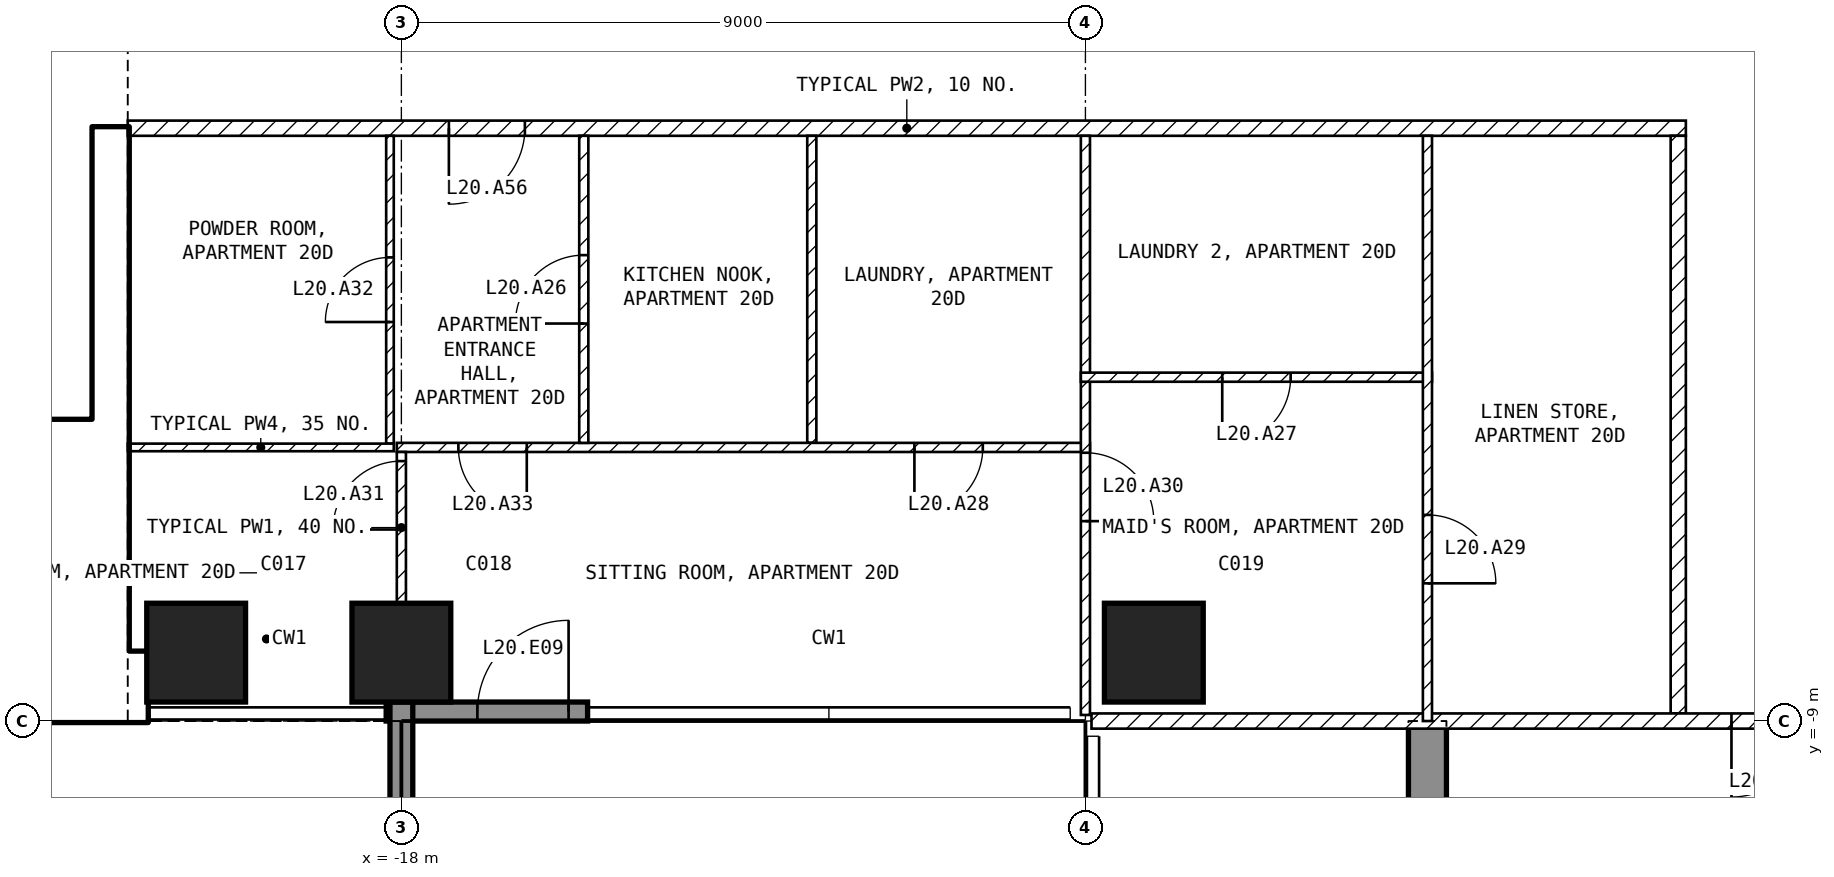
"""IFC4 building model, lengths in metres.
Left out: names, types, materials, properties, quantities, classifications, styles, units other than length and angle.
Written with IfcOpenShell. Run it as: python <this file> out.ifc"""

import sys

from ifc_helpers import new_model, si_unit, direction, frame, frame_2d, origin, origin_2d, place, context, subcontext, project, spatial, polyline, rectangle, outline, extrude, element, fill, save


model = new_model("IFC4")
c1 = context("Model", 3, precision=1e-05, world=origin(), true_north=direction((0.0, 1.0)))
c2 = subcontext(c1, "Body", "Model", "MODEL_VIEW")
j1 = project(units=[si_unit("LENGTHUNIT", "METRE"), si_unit("PLANEANGLEUNIT", "RADIAN")], contexts=[c1])
p1 = place(None, origin())
s1 = spatial("IfcSite", under=j1, at=p1, CompositionType="ELEMENT")
p2 = place(p1, origin())
s2 = spatial("IfcBuilding", under=s1, at=p2, CompositionType="ELEMENT")
p3 = place(p2, frame((0.0, 0.0, 89.0)))
s3 = spatial("IfcBuildingStorey", under=s2, at=p3, CompositionType="ELEMENT", Elevation=89.0)
for number, where, z_axis, x_axis in (
    (1, (-20.7, -8.1, -0.25), (0.0, 0.0, 1.0), (1.0, 0.0, 0.0)),
    (2, (-18.0, -8.1, -0.25), (0.0, 0.0, 1.0), (1.0, 0.0, 0.0)),
    (3, (-8.1, -8.1, -0.25), (0.0, 0.0, 1.0), (1.0, 0.0, 0.0)),
):
    element("IfcColumn", number, at=place(p3, frame(where, z_axis=z_axis, x_axis=x_axis)), inside=s3, PredefinedType="COLUMN", context=c2, shape_type="SweptSolid", body=[
        extrude(rectangle(XDim=1.3, YDim=1.3, at=origin_2d()), origin(), (0.0, 0.0, 1.0), 3.45),
    ])
p4 = place(p3, frame((-4.75, -25.45, -0.25), z_axis=(1.0, 0.0, 0.0), x_axis=(0.0, 1.0, 0.0)))
e4 = element("IfcWall", 4, at=p4, inside=s3, PredefinedType="SHEAR", context=c2, shape_type="SweptSolid", body=[
    extrude(outline(polyline([(0.0, 0.0), (4.15, 0.0), (4.15, 2.65), (6.55, 2.65), (6.55, 0.0), (11.95, 0.0), (11.95, 2.65), (14.35, 2.65), (14.35, 0.0), (16.45, 0.0), (16.45, 3.45), (0.0, 3.45), (0.0, 0.0)])), origin(), (0.0, 0.0, 1.0), 0.5),
])
p5 = place(p3, frame((-18.2, -8.875, 0.0), z_axis=(0.0, 0.0, 1.0), x_axis=(1.0, 0.0, 0.0)))
e5 = element("IfcWall", 5, at=p5, inside=s3, PredefinedType="SOLIDWALL", context=c2, shape_type="SweptSolid", body=[
    extrude(rectangle(XDim=2.65, YDim=0.25, at=frame_2d((1.325, 0.0))), origin(), (0.0, 0.0, 1.0), 3.2),
])
p6 = place(p5, frame((1.2, 0.0, 0.0)))
e6 = element("IfcOpeningElement", 6, at=p6, cuts=e5, PredefinedType="OPENING", context=c2, shape_type="SweptSolid", body=[
    extrude(rectangle(XDim=1.2, YDim=2.4, at=frame_2d((0.6, 1.2))), frame((0.0, 0.135, 0.0), z_axis=(0.0, -1.0, 0.0), x_axis=(1.0, 0.0, 0.0)), (0.0, 0.0, 1.0), 0.27),
])
p7 = place(p3, frame((-18.0, -8.75, 0.0), z_axis=(0.0, 0.0, 1.0), x_axis=(0.0, -1.0, 0.0)))
e7 = element("IfcWall", 7, at=p7, inside=s3, PredefinedType="SOLIDWALL", context=c2, shape_type="SweptSolid", body=[
    extrude(rectangle(XDim=2.95, YDim=0.3, at=frame_2d((1.475, 0.0))), origin(), (0.0, 0.0, 1.0), 3.2),
])
p8 = place(p3, frame((-32.4, -8.55, 0.0), z_axis=(0.0, 0.0, 1.0), x_axis=(1.0, 0.0, 0.0)))
e8 = element("IfcWall", 8, at=p8, inside=s3, PredefinedType="SHEAR", context=c2, shape_type="SweptSolid", body=[
    extrude(rectangle(XDim=11.05, YDim=0.9, at=frame_2d((5.525, 0.0))), origin(), (0.0, 0.0, 1.0), 3.2),
])
p9 = place(p3, frame((-21.825, -8.1, 0.0), z_axis=(0.0, 0.0, 1.0), x_axis=(0.0, 1.0, 0.0)))
e9 = element("IfcWall", 9, at=p9, inside=s3, PredefinedType="SHEAR", context=c2, shape_type="SweptSolid", body=[
    extrude(rectangle(XDim=6.9, YDim=0.45, at=frame_2d((3.45, 0.0))), origin(), (0.0, 0.0, 1.0), 3.2),
])
p10 = place(p3, frame((-28.35, -5.15, 0.0), z_axis=(0.0, 0.0, 1.0), x_axis=(1.0, 0.0, 0.0)))
e10 = element("IfcWall", 10, at=p10, inside=s3, PredefinedType="SOLIDWALL", context=c2, shape_type="SweptSolid", body=[
    extrude(rectangle(XDim=6.3, YDim=0.2, at=frame_2d((3.15, 0.0))), origin(), (0.0, 0.0, 1.0), 3.2),
])
p11 = place(p10, frame((5.1, 0.0, 0.0)))
e11 = element("IfcOpeningElement", 11, at=p11, cuts=e10, PredefinedType="OPENING", context=c2, shape_type="SweptSolid", body=[
    extrude(rectangle(XDim=1.0, YDim=2.1, at=frame_2d((0.5, 1.05))), frame((0.0, 0.11, 0.0), z_axis=(0.0, -1.0, 0.0), x_axis=(1.0, 0.0, 0.0)), (0.0, 0.0, 1.0), 0.22),
])
p12 = place(p3, frame((-1.1, -1.2, 0.0), z_axis=(0.0, 0.0, 1.0), x_axis=(-1.0, 0.0, 0.0)))
e12 = element("IfcWall", 12, at=p12, inside=s3, PredefinedType="PARTITIONING", context=c2, shape_type="SweptSolid", body=[
    extrude(rectangle(XDim=20.5, YDim=0.2, at=frame_2d((10.25, 0.0))), origin(), (0.0, 0.0, 1.0), 3.2),
])
p13 = place(p12, frame((15.275, 0.0, 0.0)))
e13 = element("IfcOpeningElement", 13, at=p13, cuts=e12, PredefinedType="OPENING", context=c2, shape_type="SweptSolid", body=[
    extrude(rectangle(XDim=1.0, YDim=2.1, at=frame_2d((0.5, 1.05))), frame((0.0, 0.11, 0.0), z_axis=(0.0, -1.0, 0.0), x_axis=(1.0, 0.0, 0.0)), (0.0, 0.0, 1.0), 0.22),
])
p14 = place(p3, frame((-1.2, -8.9, 0.0), z_axis=(0.0, 0.0, 1.0), x_axis=(0.0, 1.0, 0.0)))
e14 = element("IfcWall", 14, at=p14, inside=s3, PredefinedType="PARTITIONING", context=c2, shape_type="SweptSolid", body=[
    extrude(rectangle(XDim=7.6, YDim=0.2, at=frame_2d((3.8, 0.0))), origin(), (0.0, 0.0, 1.0), 3.2),
])
p15 = place(p3, frame((8.92, -9.0, 0.0), z_axis=(0.0, 0.0, 1.0), x_axis=(-1.0, 0.0, 0.0)))
e15 = element("IfcWall", 15, at=p15, inside=s3, PredefinedType="PARTITIONING", context=c2, shape_type="SweptSolid", body=[
    extrude(rectangle(XDim=17.84, YDim=0.2, at=frame_2d((8.92, 0.0))), origin(), (0.0, 0.0, 1.0), 3.2),
])
p16 = place(p15, frame((8.42, 0.0, 0.0)))
e16 = element("IfcOpeningElement", 16, at=p16, cuts=e15, PredefinedType="OPENING", context=c2, shape_type="SweptSolid", body=[
    extrude(rectangle(XDim=1.0, YDim=2.1, at=frame_2d((0.5, 1.05))), frame((0.0, 0.11, 0.0), z_axis=(0.0, -1.0, 0.0), x_axis=(1.0, 0.0, 0.0)), (0.0, 0.0, 1.0), 0.22),
])
p17 = place(p3, frame((-12.6, -5.34, 0.0), z_axis=(0.0, 0.0, 1.0), x_axis=(0.0, 1.0, 0.0)))
e17 = element("IfcWall", 17, at=p17, inside=s3, PredefinedType="PARTITIONING", context=c2, shape_type="SweptSolid", body=[
    extrude(rectangle(XDim=4.04, YDim=0.12, at=frame_2d((2.02, 0.0))), origin(), (0.0, 0.0, 1.0), 3.2),
])
p18 = place(p3, frame((-8.94, -5.4, 0.0), z_axis=(0.0, 0.0, 1.0), x_axis=(-1.0, 0.0, 0.0)))
e18 = element("IfcWall", 18, at=p18, inside=s3, PredefinedType="PARTITIONING", context=c2, shape_type="SweptSolid", body=[
    extrude(rectangle(XDim=9.12, YDim=0.12, at=frame_2d((4.56, 0.0))), origin(), (0.0, 0.0, 1.0), 3.2),
])
p19 = place(p18, frame((1.41, 0.0, 0.0)))
e19 = element("IfcOpeningElement", 19, at=p19, cuts=e18, PredefinedType="OPENING", context=c2, shape_type="SweptSolid", body=[
    extrude(rectangle(XDim=0.9, YDim=2.1, at=frame_2d((0.45, 1.05))), frame((0.0, 0.07, 0.0), z_axis=(0.0, -1.0, 0.0), x_axis=(1.0, 0.0, 0.0)), (0.0, 0.0, 1.0), 0.14),
])
p20 = place(p18, frame((7.41, 0.0, 0.0)))
e20 = element("IfcOpeningElement", 20, at=p20, cuts=e18, PredefinedType="OPENING", context=c2, shape_type="SweptSolid", body=[
    extrude(rectangle(XDim=0.9, YDim=2.1, at=frame_2d((0.45, 1.05))), frame((0.0, 0.07, 0.0), z_axis=(0.0, -1.0, 0.0), x_axis=(1.0, 0.0, 0.0)), (0.0, 0.0, 1.0), 0.14),
])
p21 = place(p3, frame((-9.0, -1.3, 0.0), z_axis=(0.0, 0.0, 1.0), x_axis=(0.0, -1.0, 0.0)))
e21 = element("IfcWall", 21, at=p21, inside=s3, PredefinedType="PARTITIONING", context=c2, shape_type="SweptSolid", body=[
    extrude(rectangle(XDim=7.62, YDim=0.12, at=frame_2d((3.81, 0.0))), origin(), (0.0, 0.0, 1.0), 3.2),
])
p22 = place(p21, frame((4.17, 0.0, 0.0)))
e22 = element("IfcOpeningElement", 22, at=p22, cuts=e21, PredefinedType="OPENING", context=c2, shape_type="SweptSolid", body=[
    extrude(rectangle(XDim=0.9, YDim=2.1, at=frame_2d((0.45, 1.05))), frame((0.0, 0.07, 0.0), z_axis=(0.0, -1.0, 0.0), x_axis=(1.0, 0.0, 0.0)), (0.0, 0.0, 1.0), 0.14),
])
p23 = place(p3, frame((-15.6, -5.34, 0.0), z_axis=(0.0, 0.0, 1.0), x_axis=(0.0, 1.0, 0.0)))
e23 = element("IfcWall", 23, at=p23, inside=s3, PredefinedType="PARTITIONING", context=c2, shape_type="SweptSolid", body=[
    extrude(rectangle(XDim=4.04, YDim=0.12, at=frame_2d((2.02, 0.0))), origin(), (0.0, 0.0, 1.0), 3.2),
])
p24 = place(p23, frame((1.57, 0.0, 0.0)))
e24 = element("IfcOpeningElement", 24, at=p24, cuts=e23, PredefinedType="OPENING", context=c2, shape_type="SweptSolid", body=[
    extrude(rectangle(XDim=0.9, YDim=2.1, at=frame_2d((0.45, 1.05))), frame((0.0, 0.07, 0.0), z_axis=(0.0, -1.0, 0.0), x_axis=(1.0, 0.0, 0.0)), (0.0, 0.0, 1.0), 0.14),
])
p25 = place(p3, frame((-18.15, -5.35, 0.0), z_axis=(0.0, 0.0, 1.0), x_axis=(0.0, 1.0, 0.0)))
e25 = element("IfcWall", 25, at=p25, inside=s3, PredefinedType="PARTITIONING", context=c2, shape_type="SweptSolid", body=[
    extrude(rectangle(XDim=4.05, YDim=0.1, at=frame_2d((2.025, 0.0))), origin(), (0.0, 0.0, 1.0), 2.296),
])
p26 = place(p25, frame((1.6, 0.0, 0.0)))
e26 = element("IfcOpeningElement", 26, at=p26, cuts=e25, PredefinedType="OPENING", context=c2, shape_type="SweptSolid", body=[
    extrude(rectangle(XDim=0.85, YDim=2.1, at=frame_2d((0.425, 1.05))), frame((0.0, 0.06, 0.0), z_axis=(0.0, -1.0, 0.0), x_axis=(1.0, 0.0, 0.0)), (0.0, 0.0, 1.0), 0.12),
])
p27 = place(p3, frame((-18.1, -5.4, 0.0), z_axis=(0.0, 0.0, 1.0), x_axis=(-1.0, 0.0, 0.0)))
e27 = element("IfcWall", 27, at=p27, inside=s3, PredefinedType="PARTITIONING", context=c2, shape_type="SweptSolid", body=[
    extrude(rectangle(XDim=3.5, YDim=0.1, at=frame_2d((1.75, 0.0))), origin(), (0.0, 0.0, 1.0), 3.2),
])
p28 = place(p3, frame((-18.0, -7.45, 0.0), z_axis=(0.0, 0.0, 1.0), x_axis=(0.0, 1.0, 0.0)))
e28 = element("IfcWall", 28, at=p28, inside=s3, PredefinedType="PARTITIONING", context=c2, shape_type="SweptSolid", body=[
    extrude(rectangle(XDim=1.99, YDim=0.12, at=frame_2d((0.995, 0.0))), origin(), (0.0, 0.0, 1.0), 2.296),
])
p29 = place(p28, frame((0.97, 0.0, 0.0)))
e29 = element("IfcOpeningElement", 29, at=p29, cuts=e28, PredefinedType="OPENING", context=c2, shape_type="SweptSolid", body=[
    extrude(rectangle(XDim=0.9, YDim=2.1, at=frame_2d((0.45, 1.05))), frame((0.0, 0.07, 0.0), z_axis=(0.0, -1.0, 0.0), x_axis=(1.0, 0.0, 0.0)), (0.0, 0.0, 1.0), 0.14),
])
p30 = place(p3, frame((-4.44, -4.476, 0.0), z_axis=(0.0, 0.0, 1.0), x_axis=(-1.0, 0.0, 0.0)))
e30 = element("IfcWall", 30, at=p30, inside=s3, PredefinedType="PARTITIONING", context=c2, shape_type="SweptSolid", body=[
    extrude(rectangle(XDim=4.62, YDim=0.12, at=frame_2d((2.31, 0.0))), origin(), (0.0, 0.0, 1.0), 3.2),
])
p31 = place(p30, frame((1.86, 0.0, 0.0)))
e31 = element("IfcOpeningElement", 31, at=p31, cuts=e30, PredefinedType="OPENING", context=c2, shape_type="SweptSolid", body=[
    extrude(rectangle(XDim=0.9, YDim=2.1, at=frame_2d((0.45, 1.05))), frame((0.0, 0.07, 0.0), z_axis=(0.0, -1.0, 0.0), x_axis=(1.0, 0.0, 0.0)), (0.0, 0.0, 1.0), 0.14),
])
p32 = place(p3, frame((-4.5, -1.3, 0.0), z_axis=(0.0, 0.0, 1.0), x_axis=(0.0, -1.0, 0.0)))
e32 = element("IfcWall", 32, at=p32, inside=s3, PredefinedType="PARTITIONING", context=c2, shape_type="SweptSolid", body=[
    extrude(rectangle(XDim=7.7, YDim=0.12, at=frame_2d((3.85, 0.0))), origin(), (0.0, 0.0, 1.0), 3.2),
])
p33 = place(p32, frame((4.988, 0.0, 0.0)))
e33 = element("IfcOpeningElement", 33, at=p33, cuts=e32, PredefinedType="OPENING", context=c2, shape_type="SweptSolid", body=[
    extrude(rectangle(XDim=0.9, YDim=2.1, at=frame_2d((0.45, 1.05))), frame((0.0, 0.07, 0.0), z_axis=(0.0, -1.0, 0.0), x_axis=(1.0, 0.0, 0.0)), (0.0, 0.0, 1.0), 0.14),
])
p34 = place(p6, origin())
e34 = element("IfcDoor", 34, at=p34, inside=s3, OperationType="SINGLE_SWING_RIGHT", PredefinedType="DOOR", context=c2, shape_type="SweptSolid", body=[
    extrude(rectangle(XDim=1.2, YDim=2.4, at=frame_2d((0.6, 1.2))), frame((0.0, 0.025, 0.0), z_axis=(0.0, -1.0, 0.0), x_axis=(1.0, 0.0, 0.0)), (0.0, 0.0, 1.0), 0.05),
])
fill(e6, e34)
p35 = place(p11, origin())
e35 = element("IfcDoor", 35, at=p35, inside=s3, OperationType="SINGLE_SWING_LEFT", PredefinedType="DOOR", context=c2, shape_type="SweptSolid", body=[
    extrude(rectangle(XDim=1.0, YDim=2.1, at=frame_2d((0.5, 1.05))), frame((0.0, 0.025, 0.0), z_axis=(0.0, -1.0, 0.0), x_axis=(1.0, 0.0, 0.0)), (0.0, 0.0, 1.0), 0.05),
])
fill(e11, e35)
p36 = place(p24, origin())
e36 = element("IfcDoor", 36, at=p36, inside=s3, OperationType="SINGLE_SWING_LEFT", PredefinedType="DOOR", context=c2, shape_type="SweptSolid", body=[
    extrude(rectangle(XDim=0.9, YDim=2.1, at=frame_2d((0.45, 1.05))), frame((0.0, 0.025, 0.0), z_axis=(0.0, -1.0, 0.0), x_axis=(1.0, 0.0, 0.0)), (0.0, 0.0, 1.0), 0.05),
])
fill(e24, e36)
p37 = place(p31, origin())
e37 = element("IfcDoor", 37, at=p37, inside=s3, OperationType="SINGLE_SWING_RIGHT", PredefinedType="DOOR", context=c2, shape_type="SweptSolid", body=[
    extrude(rectangle(XDim=0.9, YDim=2.1, at=frame_2d((0.45, 1.05))), frame((0.0, 0.025, 0.0), z_axis=(0.0, -1.0, 0.0), x_axis=(1.0, 0.0, 0.0)), (0.0, 0.0, 1.0), 0.05),
])
fill(e31, e37)
p38 = place(p19, origin())
e38 = element("IfcDoor", 38, at=p38, inside=s3, OperationType="SINGLE_SWING_RIGHT", PredefinedType="DOOR", context=c2, shape_type="SweptSolid", body=[
    extrude(rectangle(XDim=0.9, YDim=2.1, at=frame_2d((0.45, 1.05))), frame((0.0, 0.025, 0.0), z_axis=(0.0, -1.0, 0.0), x_axis=(1.0, 0.0, 0.0)), (0.0, 0.0, 1.0), 0.05),
])
fill(e19, e38)
p39 = place(p33, origin())
e39 = element("IfcDoor", 39, at=p39, inside=s3, OperationType="SINGLE_SWING_RIGHT", PredefinedType="DOOR", context=c2, shape_type="SweptSolid", body=[
    extrude(rectangle(XDim=0.9, YDim=2.1, at=frame_2d((0.45, 1.05))), frame((0.0, 0.025, 0.0), z_axis=(0.0, -1.0, 0.0), x_axis=(1.0, 0.0, 0.0)), (0.0, 0.0, 1.0), 0.05),
])
fill(e33, e39)
p40 = place(p22, origin())
e40 = element("IfcDoor", 40, at=p40, inside=s3, OperationType="SINGLE_SWING_RIGHT", PredefinedType="DOOR", context=c2, shape_type="SweptSolid", body=[
    extrude(rectangle(XDim=0.9, YDim=2.1, at=frame_2d((0.45, 1.05))), frame((0.0, 0.025, 0.0), z_axis=(0.0, -1.0, 0.0), x_axis=(1.0, 0.0, 0.0)), (0.0, 0.0, 1.0), 0.05),
])
fill(e22, e40)
p41 = place(p29, origin())
e41 = element("IfcDoor", 41, at=p41, inside=s3, OperationType="SINGLE_SWING_LEFT", PredefinedType="DOOR", context=c2, shape_type="SweptSolid", body=[
    extrude(rectangle(XDim=0.9, YDim=2.1, at=frame_2d((0.45, 1.05))), frame((0.0, 0.025, 0.0), z_axis=(0.0, -1.0, 0.0), x_axis=(1.0, 0.0, 0.0)), (0.0, 0.0, 1.0), 0.05),
])
fill(e29, e41)
p42 = place(p26, origin())
e42 = element("IfcDoor", 42, at=p42, inside=s3, OperationType="SINGLE_SWING_LEFT", PredefinedType="DOOR", context=c2, shape_type="SweptSolid", body=[
    extrude(rectangle(XDim=0.85, YDim=2.1, at=frame_2d((0.425, 1.05))), frame((0.0, 0.025, 0.0), z_axis=(0.0, -1.0, 0.0), x_axis=(1.0, 0.0, 0.0)), (0.0, 0.0, 1.0), 0.05),
])
fill(e26, e42)
p43 = place(p20, origin())
e43 = element("IfcDoor", 43, at=p43, inside=s3, OperationType="SINGLE_SWING_LEFT", PredefinedType="DOOR", context=c2, shape_type="SweptSolid", body=[
    extrude(rectangle(XDim=0.9, YDim=2.1, at=frame_2d((0.45, 1.05))), frame((0.0, 0.025, 0.0), z_axis=(0.0, -1.0, 0.0), x_axis=(1.0, 0.0, 0.0)), (0.0, 0.0, 1.0), 0.05),
])
fill(e20, e43)
p44 = place(p16, origin())
e44 = element("IfcDoor", 44, at=p44, inside=s3, OperationType="SINGLE_SWING_RIGHT", PredefinedType="DOOR", context=c2, shape_type="SweptSolid", body=[
    extrude(rectangle(XDim=1.0, YDim=2.1, at=frame_2d((0.5, 1.05))), frame((0.0, 0.025, 0.0), z_axis=(0.0, -1.0, 0.0), x_axis=(1.0, 0.0, 0.0)), (0.0, 0.0, 1.0), 0.05),
])
fill(e16, e44)
p45 = place(p13, origin())
e45 = element("IfcDoor", 45, at=p45, inside=s3, OperationType="SINGLE_SWING_RIGHT", PredefinedType="DOOR", context=c2, shape_type="SweptSolid", body=[
    extrude(rectangle(XDim=1.0, YDim=2.1, at=frame_2d((0.5, 1.05))), frame((0.0, 0.025, 0.0), z_axis=(0.0, -1.0, 0.0), x_axis=(1.0, 0.0, 0.0)), (0.0, 0.0, 1.0), 0.05),
])
fill(e13, e45)
save(model, sys.argv[1])
